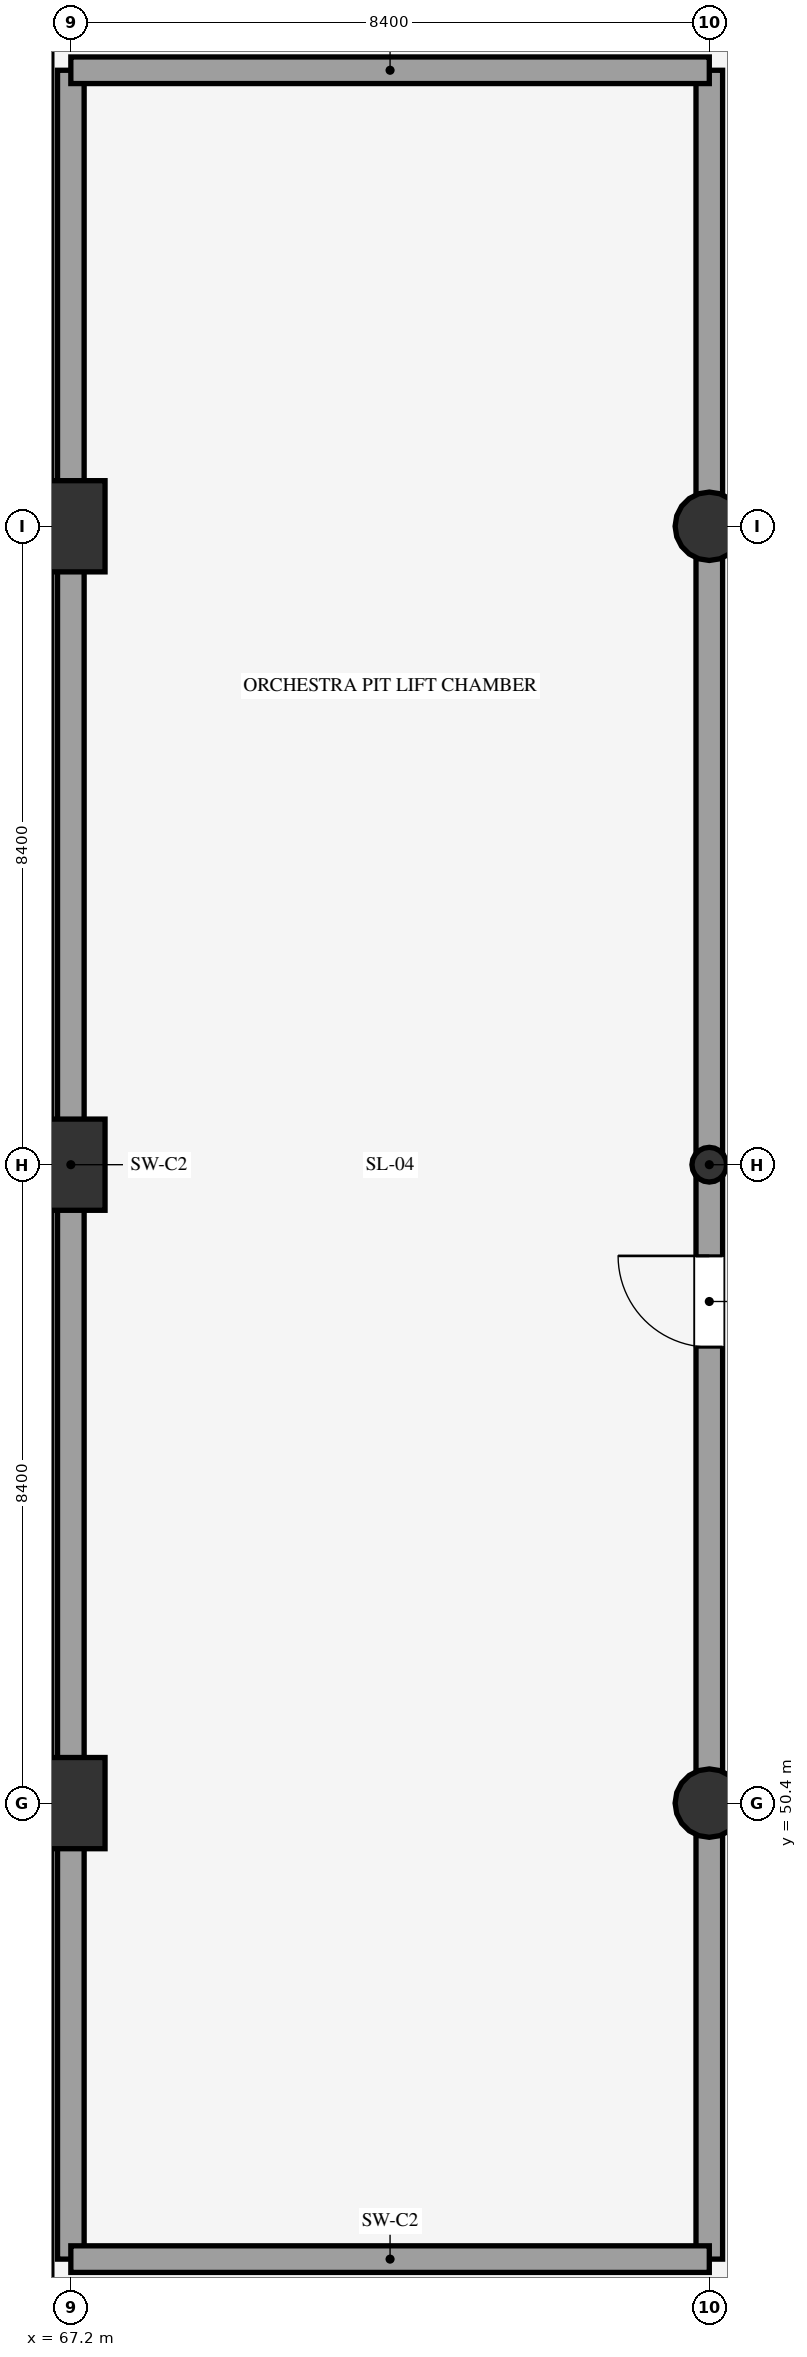
"""IFC4 building model, lengths in metres.
Left out: names, types, materials, properties, quantities, classifications, styles, units other than length and angle.
Written with IfcOpenShell. Run it as: python <this file> out.ifc"""

import sys

from ifc_helpers import new_model, si_unit, direction, frame, frame_2d, origin, origin_2d, place, context, subcontext, project, spatial, rectangle, circle, hollow_circle, extrude, element, fill, save


model = new_model("IFC4")
c1 = context("Model", 3, precision=1e-05, world=origin(), true_north=direction((0.0, 1.0)))
c2 = subcontext(c1, "Body", "Model", "MODEL_VIEW")
j1 = project(units=[si_unit("LENGTHUNIT", "METRE"), si_unit("PLANEANGLEUNIT", "RADIAN")], contexts=[c1])
p1 = place(None, origin())
s1 = spatial("IfcSite", under=j1, at=p1, CompositionType="ELEMENT")
p2 = place(p1, origin())
s2 = spatial("IfcBuilding", under=s1, at=p2, CompositionType="ELEMENT")
p3 = place(p2, frame((0.0, 0.0, -5.4)))
s3 = spatial("IfcBuildingStorey", under=s2, at=p3, CompositionType="ELEMENT", Elevation=-5.4)
for number, where, z_axis, x_axis in (
    (1, (67.2, 50.4, 0.0), (0.0, 0.0, 1.0), (1.0, 0.0, 0.0)),
    (2, (67.2, 58.8, 0.0), (0.0, 0.0, 1.0), (1.0, 0.0, 0.0)),
    (3, (67.2, 67.2, 0.0), (0.0, 0.0, 1.0), (1.0, 0.0, 0.0)),
):
    element("IfcColumn", number, at=place(p3, frame(where, z_axis=z_axis, x_axis=x_axis)), inside=s3, PredefinedType="COLUMN", context=c2, shape_type="SweptSolid", body=[
        extrude(rectangle(XDim=0.9, YDim=1.2, at=origin_2d()), origin(), (0.0, 0.0, 1.0), 5.4),
    ])
p4 = place(p3, frame((75.6, 50.4, 0.0), z_axis=(0.0, 0.0, 1.0), x_axis=(1.0, 0.0, 0.0)))
e4 = element("IfcColumn", 4, at=p4, inside=s3, PredefinedType="COLUMN", context=c2, shape_type="SweptSolid", body=[
    extrude(circle(Radius=0.45, at=origin_2d()), origin(), (0.0, 0.0, 1.0), 5.4),
])
p5 = place(p3, frame((75.6, 58.8, 0.0), z_axis=(0.0, 0.0, 1.0), x_axis=(1.0, 0.0, 0.0)))
e5 = element("IfcColumn", 5, at=p5, inside=s3, PredefinedType="COLUMN", context=c2, shape_type="SweptSolid", body=[
    extrude(hollow_circle(Radius=0.229, WallThickness=0.02, at=origin_2d()), origin(), (0.0, 0.0, 1.0), 5.4),
])
p6 = place(p3, frame((75.6, 67.2, 0.0), z_axis=(0.0, 0.0, 1.0), x_axis=(1.0, 0.0, 0.0)))
e6 = element("IfcColumn", 6, at=p6, inside=s3, PredefinedType="COLUMN", context=c2, shape_type="SweptSolid", body=[
    extrude(circle(Radius=0.45, at=origin_2d()), origin(), (0.0, 0.0, 1.0), 5.4),
])
p7 = place(p3, frame((67.2, 44.4, 0.0), z_axis=(0.0, 0.0, 1.0), x_axis=(0.0, 1.0, 0.0)))
e7 = element("IfcWall", 7, at=p7, inside=s3, PredefinedType="SHEAR", context=c2, shape_type="SweptSolid", body=[
    extrude(rectangle(XDim=28.8, YDim=0.35, at=frame_2d((14.4, 0.0))), origin(), (0.0, 0.0, 1.0), 5.1),
])
p8 = place(p3, frame((75.6, 44.4, 0.0), z_axis=(0.0, 0.0, 1.0), x_axis=(0.0, 1.0, 0.0)))
e8 = element("IfcWall", 8, at=p8, inside=s3, PredefinedType="SHEAR", context=c2, shape_type="SweptSolid", body=[
    extrude(rectangle(XDim=28.8, YDim=0.35, at=frame_2d((14.4, 0.0))), origin(), (0.0, 0.0, 1.0), 5.1),
])
p9 = place(p8, frame((12.0, 0.0, 0.0)))
e9 = element("IfcOpeningElement", 9, at=p9, cuts=e8, PredefinedType="OPENING", context=c2, shape_type="SweptSolid", body=[
    extrude(rectangle(XDim=1.2, YDim=2.15, at=frame_2d((0.6, 1.075))), frame((0.0, 0.185, 0.0), z_axis=(0.0, -1.0, 0.0), x_axis=(1.0, 0.0, 0.0)), (0.0, 0.0, 1.0), 0.37),
])
for number, where, z_axis, x_axis in (
    (10, (67.2, 44.4, 0.0), (0.0, 0.0, 1.0), (1.0, 0.0, 0.0)),
    (11, (67.2, 73.2, 0.0), (0.0, 0.0, 1.0), (1.0, 0.0, 0.0)),
):
    element("IfcWall", number, at=place(p3, frame(where, z_axis=z_axis, x_axis=x_axis)), inside=s3, PredefinedType="SHEAR", context=c2, shape_type="SweptSolid", body=[
        extrude(rectangle(XDim=8.4, YDim=0.35, at=frame_2d((4.2, 0.0))), origin(), (0.0, 0.0, 1.0), 5.1),
    ])
p10 = place(p9, origin())
e12 = element("IfcDoor", 12, at=p10, inside=s3, OperationType="SINGLE_SWING_RIGHT", PredefinedType="DOOR", context=c2, shape_type="SweptSolid", body=[
    extrude(rectangle(XDim=1.2, YDim=2.15, at=frame_2d((0.6, 1.075))), frame((0.0, 0.025, 0.0), z_axis=(0.0, -1.0, 0.0), x_axis=(1.0, 0.0, 0.0)), (0.0, 0.0, 1.0), 0.05),
])
fill(e9, e12)
save(model, sys.argv[1])
